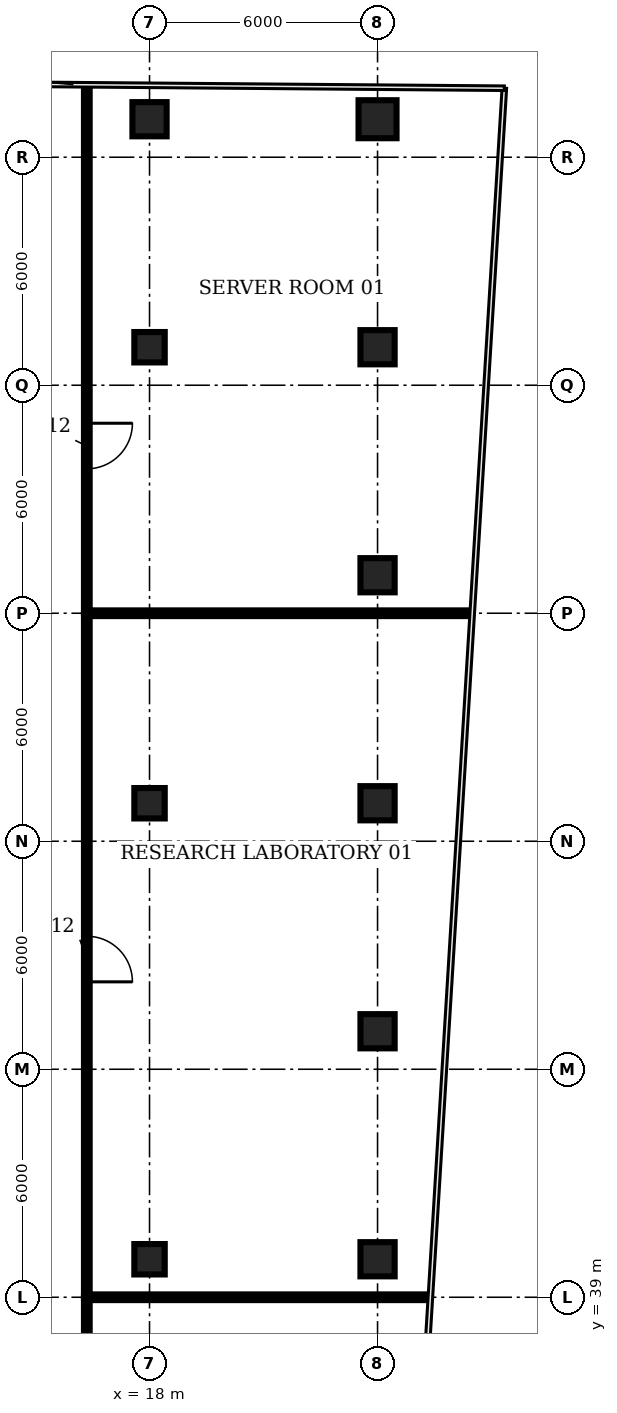
"""IFC4 building model, lengths in metres.
Left out: names, types, materials, properties, quantities, classifications, styles, units other than length and angle.
Written with IfcOpenShell. Run it as: python <this file> out.ifc"""

import sys

from ifc_helpers import new_model, si_unit, direction, frame, frame_2d, origin, origin_2d, place, context, subcontext, project, spatial, rectangle, circle, extrude, element, fill, save


model = new_model("IFC4")
c1 = context("Model", 3, precision=1e-05, world=origin(), true_north=direction((0.0, 1.0)))
c2 = subcontext(c1, "Body", "Model", "MODEL_VIEW")
j1 = project(units=[si_unit("LENGTHUNIT", "METRE"), si_unit("PLANEANGLEUNIT", "RADIAN")], contexts=[c1])
p1 = place(None, origin())
s1 = spatial("IfcSite", under=j1, at=p1, CompositionType="ELEMENT")
p2 = place(p1, origin())
s2 = spatial("IfcBuilding", under=s1, at=p2, CompositionType="ELEMENT")
p3 = place(p2, frame((0.0, 0.0, 125.6)))
s3 = spatial("IfcBuildingStorey", under=s2, at=p3, CompositionType="ELEMENT", Elevation=125.6)
for number, where, z_axis, x_axis in (
    (1, (18.0, 40.0, 0.0), (0.0, 0.0, 1.0), (1.0, 0.0, 0.0)),
    (2, (18.0, 52.0, 0.0), (0.0, 0.0, 1.0), (1.0, 0.0, 0.0)),
    (3, (18.0, 64.0, 0.0), (0.0, 0.0, 1.0), (1.0, 0.0, 0.0)),
):
    element("IfcColumn", number, at=place(p3, frame(where, z_axis=z_axis, x_axis=x_axis)), inside=s3, PredefinedType="COLUMN", context=c2, shape_type="SweptSolid", body=[
        extrude(rectangle(XDim=0.8, YDim=0.8, at=origin_2d()), origin(), (0.0, 0.0, 1.0), 3.85),
    ])
for number, where, z_axis, x_axis in (
    (4, (18.0, 70.0, 0.0), (0.0, 0.0, 1.0), (1.0, 0.0, 0.0)),
    (5, (24.0, 40.0, 0.0), (0.0, 0.0, 1.0), (1.0, 0.0, 0.0)),
    (6, (24.0, 46.0, 0.0), (0.0, 0.0, 1.0), (1.0, 0.0, 0.0)),
    (7, (24.0, 52.0, 0.0), (0.0, 0.0, 1.0), (1.0, 0.0, 0.0)),
    (8, (24.0, 58.0, 0.0), (0.0, 0.0, 1.0), (1.0, 0.0, 0.0)),
    (9, (24.0, 64.0, 0.0), (0.0, 0.0, 1.0), (1.0, 0.0, 0.0)),
):
    element("IfcColumn", number, at=place(p3, frame(where, z_axis=z_axis, x_axis=x_axis)), inside=s3, PredefinedType="COLUMN", context=c2, shape_type="SweptSolid", body=[
        extrude(rectangle(XDim=0.9, YDim=0.9, at=origin_2d()), origin(), (0.0, 0.0, 1.0), 3.85),
    ])
p4 = place(p3, frame((24.0, 70.0, 0.0), z_axis=(0.0, 0.0, 1.0), x_axis=(1.0, 0.0, 0.0)))
e10 = element("IfcColumn", 10, at=p4, inside=s3, PredefinedType="COLUMN", context=c2, shape_type="SweptSolid", body=[
    extrude(circle(Radius=0.5, at=origin_2d()), origin(), (0.0, 0.0, 1.0), 3.85),
])
p5 = place(p3, frame((16.35, 39.0, 0.0), z_axis=(0.0, 0.0, 1.0), x_axis=(0.0, -1.0, 0.0)))
e11 = element("IfcWall", 11, at=p5, inside=s3, PredefinedType="PARTITIONING", context=c2, shape_type="SweptSolid", body=[
    extrude(rectangle(XDim=4.75, YDim=0.15, at=frame_2d((2.375, 0.0))), origin(), (0.0, 0.0, 1.0), 2.83),
])
p6 = place(p5, frame((1.75, 0.0, 0.0)))
e12 = element("IfcOpeningElement", 12, at=p6, cuts=e11, PredefinedType="OPENING", context=c2, shape_type="SweptSolid", body=[
    extrude(rectangle(XDim=1.0, YDim=2.1, at=frame_2d((0.5, 1.05))), frame((0.0, 0.085, 0.0), z_axis=(0.0, -1.0, 0.0), x_axis=(1.0, 0.0, 0.0)), (0.0, 0.0, 1.0), 0.17),
])
p7 = place(p3, frame((16.35, 39.0, 0.0), z_axis=(0.0, 0.0, 1.0), x_axis=(1.0, 0.0, 0.0)))
e13 = element("IfcWall", 13, at=p7, inside=s3, PredefinedType="PARTITIONING", context=c2, shape_type="SweptSolid", body=[
    extrude(rectangle(XDim=8.99, YDim=0.15, at=frame_2d((4.495, 0.0))), origin(), (0.0, 0.0, 1.0), 2.83),
])
p8 = place(p3, frame((16.35, 57.0, 0.0), z_axis=(0.0, 0.0, 1.0), x_axis=(0.0, -1.0, 0.0)))
e14 = element("IfcWall", 14, at=p8, inside=s3, PredefinedType="PARTITIONING", context=c2, shape_type="SweptSolid", body=[
    extrude(rectangle(XDim=18.0, YDim=0.15, at=frame_2d((9.0, 0.0))), origin(), (0.0, 0.0, 1.0), 2.83),
])
p9 = place(p8, frame((8.5, 0.0, 0.0)))
e15 = element("IfcOpeningElement", 15, at=p9, cuts=e14, PredefinedType="OPENING", context=c2, shape_type="SweptSolid", body=[
    extrude(rectangle(XDim=1.2, YDim=2.1, at=frame_2d((0.6, 1.05))), frame((0.0, 0.085, 0.0), z_axis=(0.0, -1.0, 0.0), x_axis=(1.0, 0.0, 0.0)), (0.0, 0.0, 1.0), 0.17),
])
p10 = place(p3, frame((16.35, 57.0, 0.0), z_axis=(0.0, 0.0, 1.0), x_axis=(1.0, 0.0, 0.0)))
e16 = element("IfcWall", 16, at=p10, inside=s3, PredefinedType="PARTITIONING", context=c2, shape_type="SweptSolid", body=[
    extrude(rectangle(XDim=10.09, YDim=0.15, at=frame_2d((5.045, 0.0))), origin(), (0.0, 0.0, 1.0), 2.83),
])
p11 = place(p3, frame((16.35, 70.86, 0.0), z_axis=(0.0, 0.0, 1.0), x_axis=(0.0, -1.0, 0.0)))
e17 = element("IfcWall", 17, at=p11, inside=s3, PredefinedType="PARTITIONING", context=c2, shape_type="SweptSolid", body=[
    extrude(rectangle(XDim=13.86, YDim=0.15, at=frame_2d((6.93, 0.0))), origin(), (0.0, 0.0, 1.0), 2.83),
])
p12 = place(p11, frame((8.86, 0.0, 0.0)))
e18 = element("IfcOpeningElement", 18, at=p12, cuts=e17, PredefinedType="OPENING", context=c2, shape_type="SweptSolid", body=[
    extrude(rectangle(XDim=1.2, YDim=2.1, at=frame_2d((0.6, 1.05))), frame((0.0, 0.085, 0.0), z_axis=(0.0, -1.0, 0.0), x_axis=(1.0, 0.0, 0.0)), (0.0, 0.0, 1.0), 0.17),
])
p13 = place(p9, origin())
e19 = element("IfcDoor", 19, at=p13, inside=s3, OperationType="SINGLE_SWING_RIGHT", PredefinedType="DOOR", context=c2, shape_type="SweptSolid", body=[
    extrude(rectangle(XDim=1.2, YDim=2.1, at=frame_2d((0.6, 1.05))), frame((0.0, 0.025, 0.0), z_axis=(0.0, -1.0, 0.0), x_axis=(1.0, 0.0, 0.0)), (0.0, 0.0, 1.0), 0.05),
])
fill(e15, e19)
p14 = place(p12, origin())
e20 = element("IfcDoor", 20, at=p14, inside=s3, OperationType="SINGLE_SWING_LEFT", PredefinedType="DOOR", context=c2, shape_type="SweptSolid", body=[
    extrude(rectangle(XDim=1.2, YDim=2.1, at=frame_2d((0.6, 1.05))), frame((0.0, 0.025, 0.0), z_axis=(0.0, -1.0, 0.0), x_axis=(1.0, 0.0, 0.0)), (0.0, 0.0, 1.0), 0.05),
])
fill(e18, e20)
save(model, sys.argv[1])
